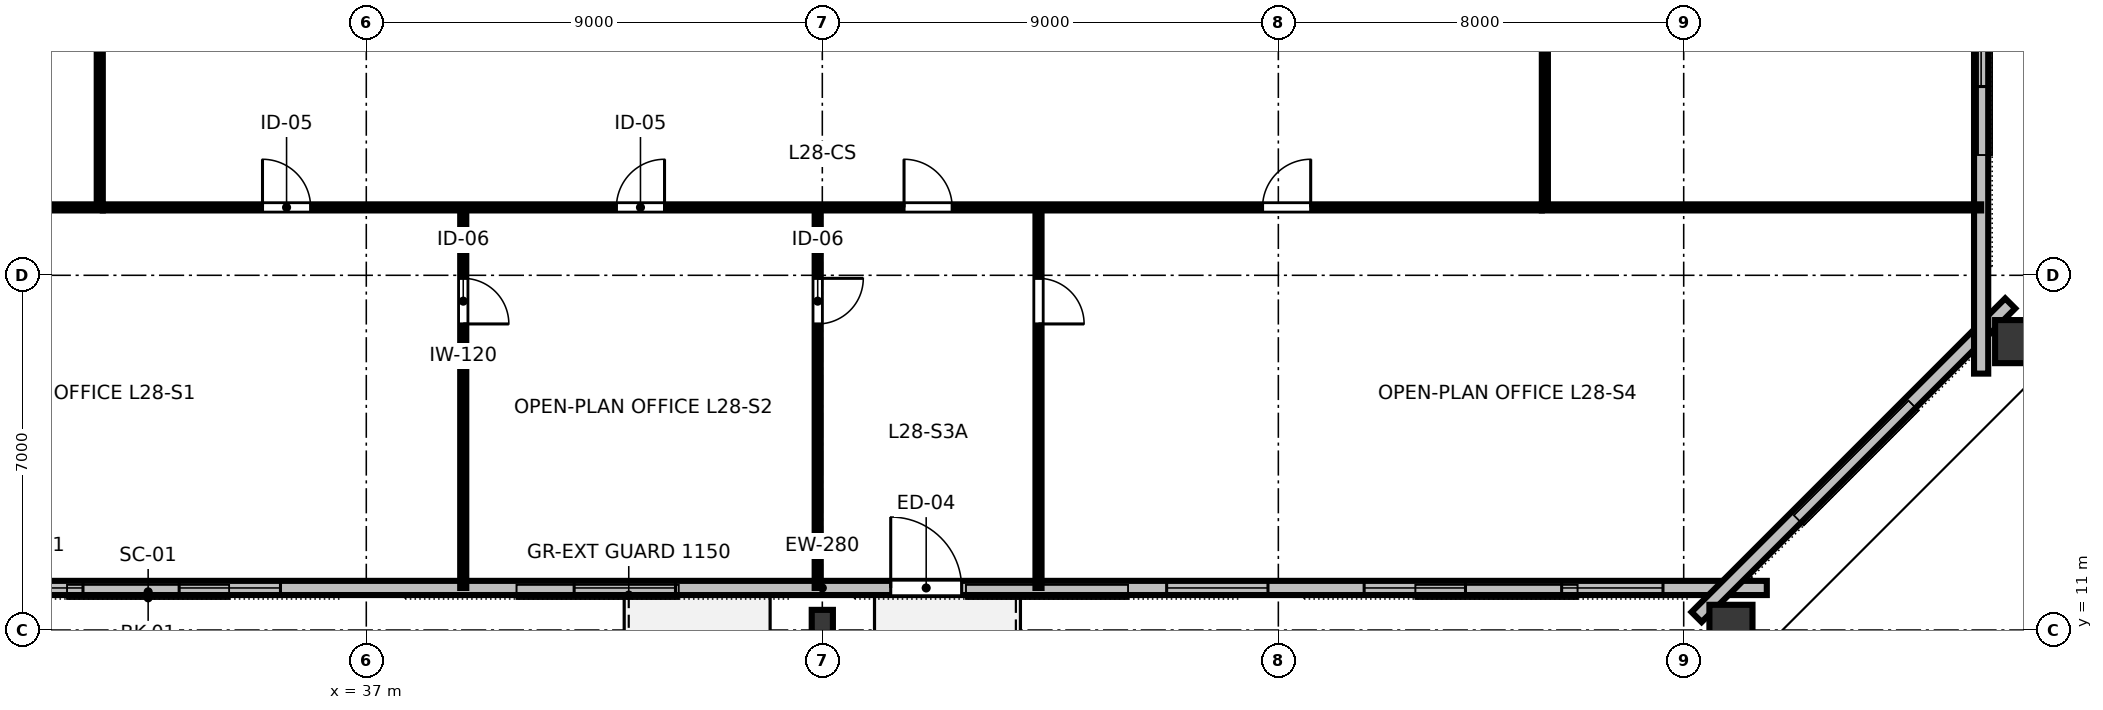
"""IFC4 building model, lengths in metres.
Left out: names, types, materials, properties, quantities, classifications, styles, units other than length and angle.
Written with IfcOpenShell. Run it as: python <this file> out.ifc"""

import sys

from ifc_helpers import new_model, si_unit, direction, frame, frame_2d, origin, origin_2d, place, context, subcontext, project, spatial, rectangle, hollow_rectangle, i_section, extrude, element, fill, save


model = new_model("IFC4")
c1 = context("Model", 3, precision=1e-05, world=origin(), true_north=direction((0.0, 1.0)))
c2 = subcontext(c1, "Body", "Model", "MODEL_VIEW")
j1 = project(units=[si_unit("LENGTHUNIT", "METRE"), si_unit("PLANEANGLEUNIT", "RADIAN")], contexts=[c1])
p1 = place(None, origin())
s1 = spatial("IfcSite", under=j1, at=p1, CompositionType="ELEMENT")
p2 = place(p1, origin())
s2 = spatial("IfcBuilding", under=s1, at=p2, CompositionType="ELEMENT")
p3 = place(p2, frame((0.0, 0.0, 109.6)))
s3 = spatial("IfcBuildingStorey", under=s2, at=p3, CompositionType="ELEMENT", Elevation=109.6)
p4 = place(p3, frame((46.0, 11.17, 0.0), z_axis=(0.0, 0.0, 1.0), x_axis=(1.0, 0.0, 0.0)))
e1 = element("IfcColumn", 1, at=p4, inside=s3, PredefinedType="COLUMN", context=c2, shape_type="SweptSolid", body=[
    extrude(i_section(OverallWidth=0.418, OverallDepth=0.455, WebThickness=0.042, FlangeThickness=0.068, FilletRadius=0.025, at=origin_2d()), origin(), (0.0, 0.0, 1.0), 3.358),
])
for number, where, z_axis, x_axis in (
    (2, (63.933, 10.998, 0.0), (0.0, 0.0, 1.0), (1.0, 0.0, 0.0)),
    (3, (69.646, 16.691, 0.0), (0.0, 0.0, 1.0), (0.0, 1.0, 0.0)),
):
    element("IfcColumn", number, at=place(p3, frame(where, z_axis=z_axis, x_axis=x_axis)), inside=s3, PredefinedType="COLUMN", context=c2, shape_type="SweptSolid", body=[
        extrude(hollow_rectangle(XDim=0.85, YDim=1.0, WallThickness=0.05, at=origin_2d()), origin(), (0.0, 0.0, 1.0), 3.358),
    ])
p5 = place(p3, frame((27.36, 11.83, 0.0), z_axis=(0.0, 0.0, 1.0), x_axis=(1.0, 0.0, 0.0)))
e4 = element("IfcWall", 4, at=p5, inside=s3, PredefinedType="STANDARD", context=c2, shape_type="SweptSolid", body=[
    extrude(rectangle(XDim=37.28, YDim=0.28, at=frame_2d((18.64, 0.0))), origin(), (0.0, 0.0, 1.0), 3.36),
])
p6 = place(p5, frame((19.99, 0.0, 0.0)))
e5 = element("IfcOpeningElement", 5, at=p6, cuts=e4, PredefinedType="OPENING", context=c2, shape_type="SweptSolid", body=[
    extrude(rectangle(XDim=1.4, YDim=2.15, at=frame_2d((0.7, 1.075))), frame((0.0, 0.15, 0.0), z_axis=(0.0, -1.0, 0.0), x_axis=(1.0, 0.0, 0.0)), (0.0, 0.0, 1.0), 0.3),
])
p7 = place(p5, frame((2.049, 0.0, 0.8)))
e6 = element("IfcOpeningElement", 6, at=p7, cuts=e4, PredefinedType="OPENING", context=c2, shape_type="SweptSolid", body=[
    extrude(rectangle(XDim=2.0, YDim=1.95, at=frame_2d((1.0, 0.975))), frame((0.0, 0.15, 0.0), z_axis=(0.0, -1.0, 0.0), x_axis=(1.0, 0.0, 0.0)), (0.0, 0.0, 1.0), 0.3),
])
p8 = place(p5, frame((5.947, 0.0, 0.8)))
e7 = element("IfcOpeningElement", 7, at=p8, cuts=e4, PredefinedType="OPENING", context=c2, shape_type="SweptSolid", body=[
    extrude(rectangle(XDim=2.0, YDim=1.95, at=frame_2d((1.0, 0.975))), frame((0.0, 0.15, 0.0), z_axis=(0.0, -1.0, 0.0), x_axis=(1.0, 0.0, 0.0)), (0.0, 0.0, 1.0), 0.3),
])
p9 = place(p5, frame((13.742, 0.0, 0.8)))
e8 = element("IfcOpeningElement", 8, at=p9, cuts=e4, PredefinedType="OPENING", context=c2, shape_type="SweptSolid", body=[
    extrude(rectangle(XDim=2.0, YDim=1.95, at=frame_2d((1.0, 0.975))), frame((0.0, 0.15, 0.0), z_axis=(0.0, -1.0, 0.0), x_axis=(1.0, 0.0, 0.0)), (0.0, 0.0, 1.0), 0.3),
])
p10 = place(p5, frame((25.436, 0.0, 0.8)))
e9 = element("IfcOpeningElement", 9, at=p10, cuts=e4, PredefinedType="OPENING", context=c2, shape_type="SweptSolid", body=[
    extrude(rectangle(XDim=2.0, YDim=1.95, at=frame_2d((1.0, 0.975))), frame((0.0, 0.15, 0.0), z_axis=(0.0, -1.0, 0.0), x_axis=(1.0, 0.0, 0.0)), (0.0, 0.0, 1.0), 0.3),
])
p11 = place(p5, frame((29.333, 0.0, 0.8)))
e10 = element("IfcOpeningElement", 10, at=p11, cuts=e4, PredefinedType="OPENING", context=c2, shape_type="SweptSolid", body=[
    extrude(rectangle(XDim=2.0, YDim=1.95, at=frame_2d((1.0, 0.975))), frame((0.0, 0.15, 0.0), z_axis=(0.0, -1.0, 0.0), x_axis=(1.0, 0.0, 0.0)), (0.0, 0.0, 1.0), 0.3),
])
p12 = place(p5, frame((33.231, 0.0, 0.8)))
e11 = element("IfcOpeningElement", 11, at=p12, cuts=e4, PredefinedType="OPENING", context=c2, shape_type="SweptSolid", body=[
    extrude(rectangle(XDim=2.0, YDim=1.95, at=frame_2d((1.0, 0.975))), frame((0.0, 0.15, 0.0), z_axis=(0.0, -1.0, 0.0), x_axis=(1.0, 0.0, 0.0)), (0.0, 0.0, 1.0), 0.3),
])
p13 = place(p3, frame((63.254, 11.256, 0.0), z_axis=(0.0, 0.0, 1.0), x_axis=(0.707106781187, 0.707106781187, 0.0)))
e12 = element("IfcWall", 12, at=p13, inside=s3, PredefinedType="STANDARD", context=c2, shape_type="SweptSolid", body=[
    extrude(rectangle(XDim=8.753, YDim=0.28, at=frame_2d((4.376, 0.0))), origin(), (0.0, 0.0, 1.0), 3.36),
])
p14 = place(p3, frame((68.87, 16.06, 0.0), z_axis=(0.0, 0.0, 1.0), x_axis=(0.0, 1.0, 0.0)))
e13 = element("IfcWall", 13, at=p14, inside=s3, PredefinedType="STANDARD", context=c2, shape_type="SweptSolid", body=[
    extrude(rectangle(XDim=31.88, YDim=0.28, at=frame_2d((15.94, 0.0))), origin(), (0.0, 0.0, 1.0), 3.36),
])
p15 = place(p14, frame((5.665, 0.0, 0.8)))
e14 = element("IfcOpeningElement", 14, at=p15, cuts=e13, PredefinedType="OPENING", context=c2, shape_type="SweptSolid", body=[
    extrude(rectangle(XDim=2.0, YDim=1.95, at=frame_2d((1.0, 0.975))), frame((0.0, 0.15, 0.0), z_axis=(0.0, -1.0, 0.0), x_axis=(1.0, 0.0, 0.0)), (0.0, 0.0, 1.0), 0.3),
])
p16 = place(p14, frame((9.375, 0.0, 0.8)))
e15 = element("IfcOpeningElement", 15, at=p16, cuts=e13, PredefinedType="OPENING", context=c2, shape_type="SweptSolid", body=[
    extrude(rectangle(XDim=2.0, YDim=1.95, at=frame_2d((1.0, 0.975))), frame((0.0, 0.15, 0.0), z_axis=(0.0, -1.0, 0.0), x_axis=(1.0, 0.0, 0.0)), (0.0, 0.0, 1.0), 0.3),
])
p17 = place(p14, frame((20.505, 0.0, 0.8)))
e16 = element("IfcOpeningElement", 16, at=p17, cuts=e13, PredefinedType="OPENING", context=c2, shape_type="SweptSolid", body=[
    extrude(rectangle(XDim=2.0, YDim=1.95, at=frame_2d((1.0, 0.975))), frame((0.0, 0.15, 0.0), z_axis=(0.0, -1.0, 0.0), x_axis=(1.0, 0.0, 0.0)), (0.0, 0.0, 1.0), 0.3),
])
p18 = place(p14, frame((24.215, 0.0, 0.8)))
e17 = element("IfcOpeningElement", 17, at=p18, cuts=e13, PredefinedType="OPENING", context=c2, shape_type="SweptSolid", body=[
    extrude(rectangle(XDim=2.0, YDim=1.95, at=frame_2d((1.0, 0.975))), frame((0.0, 0.15, 0.0), z_axis=(0.0, -1.0, 0.0), x_axis=(1.0, 0.0, 0.0)), (0.0, 0.0, 1.0), 0.3),
])
p19 = place(p3, frame((38.914, 19.34, 0.0), z_axis=(0.0, 0.0, 1.0), x_axis=(0.0, -1.0, 0.0)))
e18 = element("IfcWall", 18, at=p19, inside=s3, PredefinedType="PARTITIONING", context=c2, shape_type="SweptSolid", body=[
    extrude(rectangle(XDim=7.51, YDim=0.12, at=frame_2d((3.755, 0.0))), origin(), (0.0, 0.0, 1.0), 2.64),
])
p20 = place(p19, frame((1.4, 0.0, 0.0)))
e19 = element("IfcOpeningElement", 19, at=p20, cuts=e18, PredefinedType="OPENING", context=c2, shape_type="SweptSolid", body=[
    extrude(rectangle(XDim=0.9, YDim=2.15, at=frame_2d((0.45, 1.075))), frame((0.0, 0.07, 0.0), z_axis=(0.0, -1.0, 0.0), x_axis=(1.0, 0.0, 0.0)), (0.0, 0.0, 1.0), 0.14),
])
p21 = place(p3, frame((45.909, 19.34, 0.0), z_axis=(0.0, 0.0, 1.0), x_axis=(0.0, -1.0, 0.0)))
e20 = element("IfcWall", 20, at=p21, inside=s3, PredefinedType="PARTITIONING", context=c2, shape_type="SweptSolid", body=[
    extrude(rectangle(XDim=7.51, YDim=0.12, at=frame_2d((3.755, 0.0))), origin(), (0.0, 0.0, 1.0), 2.64),
])
p22 = place(p21, frame((1.4, 0.0, 0.0)))
e21 = element("IfcOpeningElement", 21, at=p22, cuts=e20, PredefinedType="OPENING", context=c2, shape_type="SweptSolid", body=[
    extrude(rectangle(XDim=0.9, YDim=2.15, at=frame_2d((0.45, 1.075))), frame((0.0, 0.07, 0.0), z_axis=(0.0, -1.0, 0.0), x_axis=(1.0, 0.0, 0.0)), (0.0, 0.0, 1.0), 0.14),
])
p23 = place(p3, frame((50.267, 19.34, 0.0), z_axis=(0.0, 0.0, 1.0), x_axis=(0.0, -1.0, 0.0)))
e22 = element("IfcWall", 22, at=p23, inside=s3, PredefinedType="PARTITIONING", context=c2, shape_type="SweptSolid", body=[
    extrude(rectangle(XDim=7.51, YDim=0.12, at=frame_2d((3.755, 0.0))), origin(), (0.0, 0.0, 1.0), 2.64),
])
p24 = place(p23, frame((1.4, 0.0, 0.0)))
e23 = element("IfcOpeningElement", 23, at=p24, cuts=e22, PredefinedType="OPENING", context=c2, shape_type="SweptSolid", body=[
    extrude(rectangle(XDim=0.9, YDim=2.15, at=frame_2d((0.45, 1.075))), frame((0.0, 0.07, 0.0), z_axis=(0.0, -1.0, 0.0), x_axis=(1.0, 0.0, 0.0)), (0.0, 0.0, 1.0), 0.14),
])
p25 = place(p3, frame((31.8, 19.34, 0.0), z_axis=(0.0, 0.0, 1.0), x_axis=(1.0, 0.0, 0.0)))
e24 = element("IfcWall", 24, at=p25, inside=s3, PredefinedType="PARTITIONING", context=c2, shape_type="SweptSolid", body=[
    extrude(rectangle(XDim=28.4, YDim=0.12, at=frame_2d((14.2, 0.0))), origin(), (0.0, 0.0, 1.0), 2.64),
])
p26 = place(p25, frame((3.152, 0.0, 0.0)))
e25 = element("IfcOpeningElement", 25, at=p26, cuts=e24, PredefinedType="OPENING", context=c2, shape_type="SweptSolid", body=[
    extrude(rectangle(XDim=0.95, YDim=2.15, at=frame_2d((0.475, 1.075))), frame((0.0, 0.07, 0.0), z_axis=(0.0, -1.0, 0.0), x_axis=(1.0, 0.0, 0.0)), (0.0, 0.0, 1.0), 0.14),
])
p27 = place(p25, frame((10.136, 0.0, 0.0)))
e26 = element("IfcOpeningElement", 26, at=p27, cuts=e24, PredefinedType="OPENING", context=c2, shape_type="SweptSolid", body=[
    extrude(rectangle(XDim=0.95, YDim=2.15, at=frame_2d((0.475, 1.075))), frame((0.0, 0.07, 0.0), z_axis=(0.0, -1.0, 0.0), x_axis=(1.0, 0.0, 0.0)), (0.0, 0.0, 1.0), 0.14),
])
p28 = place(p25, frame((15.813, 0.0, 0.0)))
e27 = element("IfcOpeningElement", 27, at=p28, cuts=e24, PredefinedType="OPENING", context=c2, shape_type="SweptSolid", body=[
    extrude(rectangle(XDim=0.95, YDim=2.15, at=frame_2d((0.475, 1.075))), frame((0.0, 0.07, 0.0), z_axis=(0.0, -1.0, 0.0), x_axis=(1.0, 0.0, 0.0)), (0.0, 0.0, 1.0), 0.14),
])
p29 = place(p25, frame((22.888, 0.0, 0.0)))
e28 = element("IfcOpeningElement", 28, at=p29, cuts=e24, PredefinedType="OPENING", context=c2, shape_type="SweptSolid", body=[
    extrude(rectangle(XDim=0.95, YDim=2.15, at=frame_2d((0.475, 1.075))), frame((0.0, 0.07, 0.0), z_axis=(0.0, -1.0, 0.0), x_axis=(1.0, 0.0, 0.0)), (0.0, 0.0, 1.0), 0.14),
])
p30 = place(p3, frame((31.74, 19.4, 0.0), z_axis=(0.0, 0.0, 1.0), x_axis=(0.0, 1.0, 0.0)))
e29 = element("IfcWall", 29, at=p30, inside=s3, PredefinedType="PARTITIONING", context=c2, shape_type="SweptSolid", body=[
    extrude(rectangle(XDim=11.58, YDim=0.12, at=frame_2d((5.79, 0.0))), origin(), (0.0, 0.0, 1.0), 2.64),
])
p31 = place(p30, frame((5.415, 0.0, 0.0)))
e30 = element("IfcOpeningElement", 30, at=p31, cuts=e29, PredefinedType="OPENING", context=c2, shape_type="SweptSolid", body=[
    extrude(rectangle(XDim=0.95, YDim=2.15, at=frame_2d((0.475, 1.075))), frame((0.0, 0.07, 0.0), z_axis=(0.0, -1.0, 0.0), x_axis=(1.0, 0.0, 0.0)), (0.0, 0.0, 1.0), 0.14),
])
p32 = place(p3, frame((60.26, 19.4, 0.0), z_axis=(0.0, 0.0, 1.0), x_axis=(0.0, 1.0, 0.0)))
e31 = element("IfcWall", 31, at=p32, inside=s3, PredefinedType="PARTITIONING", context=c2, shape_type="SweptSolid", body=[
    extrude(rectangle(XDim=11.58, YDim=0.12, at=frame_2d((5.79, 0.0))), origin(), (0.0, 0.0, 1.0), 2.64),
])
p33 = place(p32, frame((5.415, 0.0, 0.0)))
e32 = element("IfcOpeningElement", 32, at=p33, cuts=e31, PredefinedType="OPENING", context=c2, shape_type="SweptSolid", body=[
    extrude(rectangle(XDim=0.95, YDim=2.15, at=frame_2d((0.475, 1.075))), frame((0.0, 0.07, 0.0), z_axis=(0.0, -1.0, 0.0), x_axis=(1.0, 0.0, 0.0)), (0.0, 0.0, 1.0), 0.14),
])
for number, where, z_axis, x_axis in (
    (33, (31.8, 19.34, 0.0), (0.0, 0.0, 1.0), (-1.0, 0.0, 0.0)),
    (34, (60.2, 19.34, 0.0), (0.0, 0.0, 1.0), (1.0, 0.0, 0.0)),
):
    element("IfcWall", number, at=place(p3, frame(where, z_axis=z_axis, x_axis=x_axis)), inside=s3, PredefinedType="PARTITIONING", context=c2, shape_type="SweptSolid", body=[
        extrude(rectangle(XDim=8.67, YDim=0.12, at=frame_2d((4.335, 0.0))), origin(), (0.0, 0.0, 1.0), 2.64),
    ])
p34 = place(p6, origin())
e35 = element("IfcDoor", 35, at=p34, inside=s3, OperationType="SINGLE_SWING_LEFT", PredefinedType="DOOR", context=c2, shape_type="SweptSolid", body=[
    extrude(rectangle(XDim=1.4, YDim=2.15, at=frame_2d((0.7, 1.075))), frame((0.0, 0.025, 0.0), z_axis=(0.0, -1.0, 0.0), x_axis=(1.0, 0.0, 0.0)), (0.0, 0.0, 1.0), 0.05),
])
fill(e5, e35)
p35 = place(p7, origin())
e36 = element("IfcWindow", 36, at=p35, inside=s3, PartitioningType="SINGLE_PANEL", PredefinedType="WINDOW", context=c2, shape_type="SweptSolid", body=[
    extrude(rectangle(XDim=2.0, YDim=1.95, at=frame_2d((1.0, 0.975))), frame((0.0, 0.03, 0.0), z_axis=(0.0, -1.0, 0.0), x_axis=(1.0, 0.0, 0.0)), (0.0, 0.0, 1.0), 0.06),
])
fill(e6, e36)
p36 = place(p8, origin())
e37 = element("IfcWindow", 37, at=p36, inside=s3, PartitioningType="SINGLE_PANEL", PredefinedType="WINDOW", context=c2, shape_type="SweptSolid", body=[
    extrude(rectangle(XDim=2.0, YDim=1.95, at=frame_2d((1.0, 0.975))), frame((0.0, 0.03, 0.0), z_axis=(0.0, -1.0, 0.0), x_axis=(1.0, 0.0, 0.0)), (0.0, 0.0, 1.0), 0.06),
])
fill(e7, e37)
p37 = place(p9, origin())
e38 = element("IfcWindow", 38, at=p37, inside=s3, PartitioningType="SINGLE_PANEL", PredefinedType="WINDOW", context=c2, shape_type="SweptSolid", body=[
    extrude(rectangle(XDim=2.0, YDim=1.95, at=frame_2d((1.0, 0.975))), frame((0.0, 0.03, 0.0), z_axis=(0.0, -1.0, 0.0), x_axis=(1.0, 0.0, 0.0)), (0.0, 0.0, 1.0), 0.06),
])
fill(e8, e38)
p38 = place(p10, origin())
e39 = element("IfcWindow", 39, at=p38, inside=s3, PartitioningType="SINGLE_PANEL", PredefinedType="WINDOW", context=c2, shape_type="SweptSolid", body=[
    extrude(rectangle(XDim=2.0, YDim=1.95, at=frame_2d((1.0, 0.975))), frame((0.0, 0.03, 0.0), z_axis=(0.0, -1.0, 0.0), x_axis=(1.0, 0.0, 0.0)), (0.0, 0.0, 1.0), 0.06),
])
fill(e9, e39)
p39 = place(p11, origin())
e40 = element("IfcWindow", 40, at=p39, inside=s3, PartitioningType="SINGLE_PANEL", PredefinedType="WINDOW", context=c2, shape_type="SweptSolid", body=[
    extrude(rectangle(XDim=2.0, YDim=1.95, at=frame_2d((1.0, 0.975))), frame((0.0, 0.03, 0.0), z_axis=(0.0, -1.0, 0.0), x_axis=(1.0, 0.0, 0.0)), (0.0, 0.0, 1.0), 0.06),
])
fill(e10, e40)
p40 = place(p12, origin())
e41 = element("IfcWindow", 41, at=p40, inside=s3, PartitioningType="SINGLE_PANEL", PredefinedType="WINDOW", context=c2, shape_type="SweptSolid", body=[
    extrude(rectangle(XDim=2.0, YDim=1.95, at=frame_2d((1.0, 0.975))), frame((0.0, 0.03, 0.0), z_axis=(0.0, -1.0, 0.0), x_axis=(1.0, 0.0, 0.0)), (0.0, 0.0, 1.0), 0.06),
])
fill(e11, e41)
p41 = place(p15, origin())
e42 = element("IfcWindow", 42, at=p41, inside=s3, PartitioningType="SINGLE_PANEL", PredefinedType="WINDOW", context=c2, shape_type="SweptSolid", body=[
    extrude(rectangle(XDim=2.0, YDim=1.95, at=frame_2d((1.0, 0.975))), frame((0.0, 0.03, 0.0), z_axis=(0.0, -1.0, 0.0), x_axis=(1.0, 0.0, 0.0)), (0.0, 0.0, 1.0), 0.06),
])
fill(e14, e42)
p42 = place(p20, origin())
e43 = element("IfcDoor", 43, at=p42, inside=s3, OperationType="SINGLE_SWING_RIGHT", PredefinedType="DOOR", context=c2, shape_type="SweptSolid", body=[
    extrude(rectangle(XDim=0.9, YDim=2.15, at=frame_2d((0.45, 1.075))), frame((0.0, 0.025, 0.0), z_axis=(0.0, -1.0, 0.0), x_axis=(1.0, 0.0, 0.0)), (0.0, 0.0, 1.0), 0.05),
])
fill(e19, e43)
p43 = place(p22, origin())
e44 = element("IfcDoor", 44, at=p43, inside=s3, OperationType="SINGLE_SWING_LEFT", PredefinedType="DOOR", context=c2, shape_type="SweptSolid", body=[
    extrude(rectangle(XDim=0.9, YDim=2.15, at=frame_2d((0.45, 1.075))), frame((0.0, 0.025, 0.0), z_axis=(0.0, -1.0, 0.0), x_axis=(1.0, 0.0, 0.0)), (0.0, 0.0, 1.0), 0.05),
])
fill(e21, e44)
p44 = place(p24, origin())
e45 = element("IfcDoor", 45, at=p44, inside=s3, OperationType="SINGLE_SWING_RIGHT", PredefinedType="DOOR", context=c2, shape_type="SweptSolid", body=[
    extrude(rectangle(XDim=0.9, YDim=2.15, at=frame_2d((0.45, 1.075))), frame((0.0, 0.025, 0.0), z_axis=(0.0, -1.0, 0.0), x_axis=(1.0, 0.0, 0.0)), (0.0, 0.0, 1.0), 0.05),
])
fill(e23, e45)
p45 = place(p26, origin())
e46 = element("IfcDoor", 46, at=p45, inside=s3, OperationType="SINGLE_SWING_LEFT", PredefinedType="DOOR", context=c2, shape_type="SweptSolid", body=[
    extrude(rectangle(XDim=0.95, YDim=2.15, at=frame_2d((0.475, 1.075))), frame((0.0, 0.025, 0.0), z_axis=(0.0, -1.0, 0.0), x_axis=(1.0, 0.0, 0.0)), (0.0, 0.0, 1.0), 0.05),
])
fill(e25, e46)
p46 = place(p27, origin())
e47 = element("IfcDoor", 47, at=p46, inside=s3, OperationType="SINGLE_SWING_RIGHT", PredefinedType="DOOR", context=c2, shape_type="SweptSolid", body=[
    extrude(rectangle(XDim=0.95, YDim=2.15, at=frame_2d((0.475, 1.075))), frame((0.0, 0.025, 0.0), z_axis=(0.0, -1.0, 0.0), x_axis=(1.0, 0.0, 0.0)), (0.0, 0.0, 1.0), 0.05),
])
fill(e26, e47)
p47 = place(p28, origin())
e48 = element("IfcDoor", 48, at=p47, inside=s3, OperationType="SINGLE_SWING_LEFT", PredefinedType="DOOR", context=c2, shape_type="SweptSolid", body=[
    extrude(rectangle(XDim=0.95, YDim=2.15, at=frame_2d((0.475, 1.075))), frame((0.0, 0.025, 0.0), z_axis=(0.0, -1.0, 0.0), x_axis=(1.0, 0.0, 0.0)), (0.0, 0.0, 1.0), 0.05),
])
fill(e27, e48)
p48 = place(p29, origin())
e49 = element("IfcDoor", 49, at=p48, inside=s3, OperationType="SINGLE_SWING_RIGHT", PredefinedType="DOOR", context=c2, shape_type="SweptSolid", body=[
    extrude(rectangle(XDim=0.95, YDim=2.15, at=frame_2d((0.475, 1.075))), frame((0.0, 0.025, 0.0), z_axis=(0.0, -1.0, 0.0), x_axis=(1.0, 0.0, 0.0)), (0.0, 0.0, 1.0), 0.05),
])
fill(e28, e49)
save(model, sys.argv[1])
